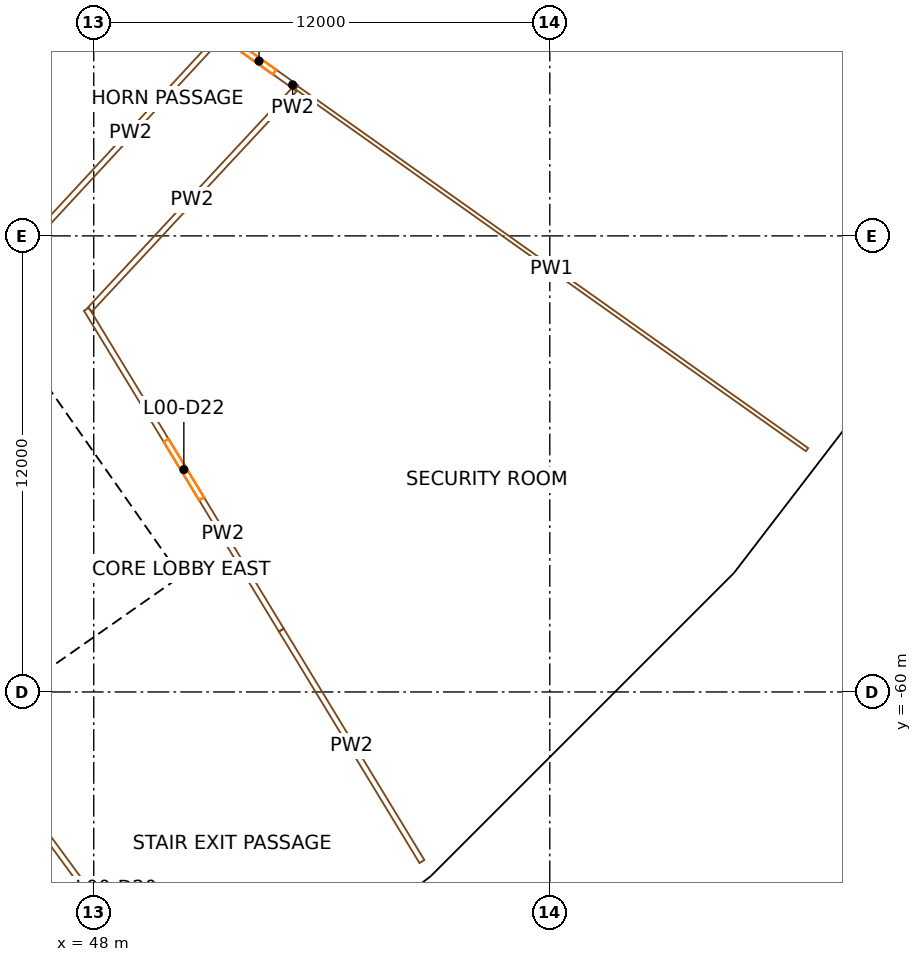
"""IFC4 building model, lengths in metres.
Left out: names, types, materials, properties, quantities, classifications, styles, units other than length and angle.
Written with IfcOpenShell. Run it as: python <this file> out.ifc"""

import sys

from ifc_helpers import new_model, si_unit, direction, frame, frame_2d, origin, origin_2d, place, context, subcontext, project, spatial, rectangle, extrude, element, fill, save


model = new_model("IFC4")
c1 = context("Model", 3, precision=1e-05, world=origin(), true_north=direction((0.0, 1.0)))
c2 = subcontext(c1, "Body", "Model", "MODEL_VIEW")
j1 = project(units=[si_unit("LENGTHUNIT", "METRE"), si_unit("PLANEANGLEUNIT", "RADIAN")], contexts=[c1])
p1 = place(None, origin())
s1 = spatial("IfcSite", under=j1, at=p1, CompositionType="ELEMENT")
p2 = place(p1, origin())
s2 = spatial("IfcBuilding", under=s1, at=p2, CompositionType="ELEMENT")
p3 = place(p2, origin())
s3 = spatial("IfcBuildingStorey", under=s2, at=p3, CompositionType="ELEMENT", Elevation=0.0)
p4 = place(p3, frame((51.264, -58.456, -0.4), z_axis=(0.0, 0.0, 1.0), x_axis=(0.751839807479, 0.6593458151, 0.0)))
e1 = element("IfcColumn", 1, at=p4, inside=s3, PredefinedType="COLUMN", context=c2, shape_type="SweptSolid", body=[
    extrude(rectangle(XDim=1.4, YDim=1.8, at=origin_2d()), origin(), (0.0, 0.0, 1.0), 9.4),
])
p5 = place(p3, frame((56.209, -64.094, -0.4), z_axis=(0.0, 0.0, 1.0), x_axis=(0.751839807479, 0.6593458151, 0.0)))
e2 = element("IfcColumn", 2, at=p5, inside=s3, PredefinedType="COLUMN", context=c2, shape_type="SweptSolid", body=[
    extrude(rectangle(XDim=1.1, YDim=1.3, at=origin_2d()), origin(), (0.0, 0.0, 1.0), 9.4),
])
p6 = place(p3, frame((58.456, -51.264, -0.4), z_axis=(0.0, 0.0, 1.0), x_axis=(0.6593458151, 0.751839807479, 0.0)))
e3 = element("IfcColumn", 3, at=p6, inside=s3, PredefinedType="COLUMN", context=c2, shape_type="SweptSolid", body=[
    extrude(rectangle(XDim=1.4, YDim=1.8, at=origin_2d()), origin(), (0.0, 0.0, 1.0), 9.4),
])
p7 = place(p3, frame((64.094, -56.209, -0.4), z_axis=(0.0, 0.0, 1.0), x_axis=(0.6593458151, 0.751839807479, 0.0)))
e4 = element("IfcColumn", 4, at=p7, inside=s3, PredefinedType="COLUMN", context=c2, shape_type="SweptSolid", body=[
    extrude(rectangle(XDim=1.1, YDim=1.3, at=origin_2d()), origin(), (0.0, 0.0, 1.0), 9.4),
])
p8 = place(p3, frame((64.647, -43.196, -0.4), z_axis=(0.0, 0.0, 1.0), x_axis=(0.55557023302, 0.831469612303, 0.0)))
e5 = element("IfcColumn", 5, at=p8, inside=s3, PredefinedType="COLUMN", context=c2, shape_type="SweptSolid", body=[
    extrude(rectangle(XDim=1.4, YDim=1.8, at=origin_2d()), origin(), (0.0, 0.0, 1.0), 9.4),
])
p9 = place(p3, frame((49.779, -57.191, 0.0), z_axis=(0.0, 0.0, 1.0), x_axis=(-0.573577477574, 0.819151315216, 0.0)))
e6 = element("IfcWall", 6, at=p9, inside=s3, PredefinedType="SHEAR", context=c2, shape_type="SweptSolid", body=[
    extrude(rectangle(XDim=14.8, YDim=0.9, at=frame_2d((7.4, 0.0))), origin(), (0.0, 0.0, 1.0), 8.6),
])
p10 = place(p9, frame((6.7, 0.0, 0.0)))
e7 = element("IfcOpeningElement", 7, at=p10, cuts=e6, PredefinedType="OPENING", context=c2, shape_type="SweptSolid", body=[
    extrude(rectangle(XDim=1.4, YDim=2.1, at=frame_2d((0.7, 1.05))), frame((0.0, 0.46, 0.0), z_axis=(0.0, -1.0, 0.0), x_axis=(1.0, 0.0, 0.0)), (0.0, 0.0, 1.0), 0.92),
])
p11 = place(p3, frame((36.827, -65.71, 0.0), z_axis=(0.0, 0.0, 1.0), x_axis=(0.819153391756, 0.573574511963, 0.0)))
e8 = element("IfcWall", 8, at=p11, inside=s3, PredefinedType="SHEAR", context=c2, shape_type="SweptSolid", body=[
    extrude(rectangle(XDim=15.045, YDim=0.9, at=frame_2d((7.523, 0.0))), origin(), (0.0, 0.0, 1.0), 8.6),
])
p12 = place(p11, frame((0.8, 0.0, 0.0)))
e9 = element("IfcOpeningElement", 9, at=p12, cuts=e8, PredefinedType="OPENING", context=c2, shape_type="SweptSolid", body=[
    extrude(rectangle(XDim=1.0, YDim=2.1, at=frame_2d((0.5, 1.05))), frame((0.0, 0.46, 0.0), z_axis=(0.0, -1.0, 0.0), x_axis=(1.0, 0.0, 0.0)), (0.0, 0.0, 1.0), 0.92),
])
p13 = place(p11, frame((3.475, 0.0, 0.0)))
e10 = element("IfcOpeningElement", 10, at=p13, cuts=e8, PredefinedType="OPENING", context=c2, shape_type="SweptSolid", body=[
    extrude(rectangle(XDim=1.0, YDim=2.1, at=frame_2d((0.5, 1.05))), frame((0.0, 0.46, 0.0), z_axis=(0.0, -1.0, 0.0), x_axis=(1.0, 0.0, 0.0)), (0.0, 0.0, 1.0), 0.92),
])
p14 = place(p11, frame((6.175, 0.0, 0.0)))
e11 = element("IfcOpeningElement", 11, at=p14, cuts=e8, PredefinedType="OPENING", context=c2, shape_type="SweptSolid", body=[
    extrude(rectangle(XDim=1.0, YDim=2.1, at=frame_2d((0.5, 1.05))), frame((0.0, 0.46, 0.0), z_axis=(0.0, -1.0, 0.0), x_axis=(1.0, 0.0, 0.0)), (0.0, 0.0, 1.0), 0.92),
])
p15 = place(p11, frame((13.495, 0.0, 0.0)))
e12 = element("IfcOpeningElement", 12, at=p15, cuts=e8, PredefinedType="OPENING", context=c2, shape_type="SweptSolid", body=[
    extrude(rectangle(XDim=1.1, YDim=2.1, at=frame_2d((0.55, 1.05))), frame((0.0, 0.46, 0.0), z_axis=(0.0, -1.0, 0.0), x_axis=(1.0, 0.0, 0.0)), (0.0, 0.0, 1.0), 0.92),
])
p16 = place(p3, frame((41.262, -57.661, 0.0), z_axis=(0.0, 0.0, 1.0), x_axis=(0.819164398642, 0.573558792102, 0.0)))
e13 = element("IfcWall", 13, at=p16, inside=s3, PredefinedType="SOLIDWALL", context=c2, shape_type="SweptSolid", body=[
    extrude(rectangle(XDim=6.795, YDim=0.3, at=frame_2d((3.397, 0.0))), origin(), (0.0, 0.0, 1.0), 8.6),
])
p17 = place(p16, frame((5.32, 0.0, 0.0)))
e14 = element("IfcOpeningElement", 14, at=p17, cuts=e13, PredefinedType="OPENING", context=c2, shape_type="SweptSolid", body=[
    extrude(rectangle(XDim=1.1, YDim=2.1, at=frame_2d((0.55, 1.05))), frame((0.0, 0.16, 0.0), z_axis=(0.0, -1.0, 0.0), x_axis=(1.0, 0.0, 0.0)), (0.0, 0.0, 1.0), 0.32),
])
p18 = place(p3, frame((46.778, -55.782, 0.0), z_axis=(0.0, 0.0, 1.0), x_axis=(0.573822822947, -0.818979467304, 0.0)))
e15 = element("IfcWall", 15, at=p18, inside=s3, PredefinedType="SOLIDWALL", context=c2, shape_type="SweptSolid", body=[
    extrude(rectangle(XDim=0.5, YDim=0.3, at=frame_2d((0.25, 0.0))), origin(), (0.0, 0.0, 1.0), 4.3),
])
p19 = place(p3, frame((47.839, -71.491, 0.0), z_axis=(0.0, 0.0, 1.0), x_axis=(0.793355377778, 0.608758773695, 0.0)))
e16 = element("IfcWall", 16, at=p19, inside=s3, PredefinedType="SOLIDWALL", context=c2, shape_type="SweptSolid", body=[
    extrude(rectangle(XDim=11.135, YDim=0.45, at=frame_2d((5.567, 0.0))), origin(), (0.0, 0.0, 1.0), 7.7),
])
p20 = place(p19, frame((8.938, 0.0, 0.0), z_axis=(0.0, 0.0, 1.0), x_axis=(-1.0, 0.0, 0.0)))
e17 = element("IfcOpeningElement", 17, at=p20, cuts=e16, PredefinedType="OPENING", context=c2, shape_type="SweptSolid", body=[
    extrude(rectangle(XDim=1.2, YDim=2.4, at=frame_2d((0.6, 1.2))), frame((0.0, 0.235, 0.0), z_axis=(0.0, -1.0, 0.0), x_axis=(1.0, 0.0, 0.0)), (0.0, 0.0, 1.0), 0.47),
])
p21 = place(p3, frame((56.699, -64.698, 0.0), z_axis=(0.0, 0.0, 1.0), x_axis=(0.707106781187, 0.707106781187, 0.0)))
e18 = element("IfcWall", 18, at=p21, inside=s3, PredefinedType="SOLIDWALL", context=c2, shape_type="SweptSolid", body=[
    extrude(rectangle(XDim=11.312, YDim=0.45, at=frame_2d((5.656, 0.0))), origin(), (0.0, 0.0, 1.0), 7.7),
])
p22 = place(p21, frame((4.756, 0.0, 0.0)))
e19 = element("IfcOpeningElement", 19, at=p22, cuts=e18, PredefinedType="OPENING", context=c2, shape_type="SweptSolid", body=[
    extrude(rectangle(XDim=1.8, YDim=2.4, at=frame_2d((0.9, 1.2))), frame((0.0, 0.235, 0.0), z_axis=(0.0, -1.0, 0.0), x_axis=(1.0, 0.0, 0.0)), (0.0, 0.0, 1.0), 0.47),
])
p23 = place(p3, frame((64.713, -56.673, 0.0), z_axis=(0.0, 0.0, 1.0), x_axis=(0.608758773695, 0.793355377778, 0.0)))
e20 = element("IfcWall", 20, at=p23, inside=s3, PredefinedType="SOLIDWALL", context=c2, shape_type="SweptSolid", body=[
    extrude(rectangle(XDim=11.135, YDim=0.45, at=frame_2d((5.567, 0.0))), origin(), (0.0, 0.0, 1.0), 7.7),
])
p24 = place(p23, frame((4.967, 0.0, 0.0)))
e21 = element("IfcOpeningElement", 21, at=p24, cuts=e20, PredefinedType="OPENING", context=c2, shape_type="SweptSolid", body=[
    extrude(rectangle(XDim=1.2, YDim=2.4, at=frame_2d((0.6, 1.2))), frame((0.0, 0.235, 0.0), z_axis=(0.0, -1.0, 0.0), x_axis=(1.0, 0.0, 0.0)), (0.0, 0.0, 1.0), 0.47),
])
p25 = place(p3, frame((46.62, -47.836, 0.0), z_axis=(0.0, 0.0, 1.0), x_axis=(0.679053871457, 0.734088441306, 0.0)))
e22 = element("IfcWall", 22, at=p25, inside=s3, PredefinedType="PARTITIONING", context=c2, shape_type="SweptSolid", body=[
    extrude(rectangle(XDim=6.916, YDim=0.15, at=frame_2d((3.458, 0.0))), origin(), (0.0, 0.0, 1.0), 7.6),
])
p26 = place(p3, frame((47.808, -49.929, 0.0), z_axis=(0.0, 0.0, 1.0), x_axis=(0.51915296508, -0.854681343454, 0.0)))
e23 = element("IfcWall", 23, at=p26, inside=s3, PredefinedType="PARTITIONING", context=c2, shape_type="SweptSolid", body=[
    extrude(rectangle(XDim=9.875, YDim=0.15, at=frame_2d((4.938, 0.0))), origin(), (0.0, 0.0, 1.0), 7.6),
])
p27 = place(p26, frame((4.037, 0.0, 0.0)))
e24 = element("IfcOpeningElement", 24, at=p27, cuts=e23, PredefinedType="OPENING", context=c2, shape_type="SweptSolid", body=[
    extrude(rectangle(XDim=1.8, YDim=2.1, at=frame_2d((0.9, 1.05))), frame((0.0, 0.085, 0.0), z_axis=(0.0, -1.0, 0.0), x_axis=(1.0, 0.0, 0.0)), (0.0, 0.0, 1.0), 0.17),
])
p28 = place(p3, frame((47.898, -49.938, 0.0), z_axis=(0.0, 0.0, 1.0), x_axis=(0.681001874973, 0.73228167141, 0.0)))
e25 = element("IfcWall", 25, at=p28, inside=s3, PredefinedType="PARTITIONING", context=c2, shape_type="SweptSolid", body=[
    extrude(rectangle(XDim=7.903, YDim=0.15, at=frame_2d((3.952, 0.0))), origin(), (0.0, 0.0, 1.0), 7.6),
])
p29 = place(p3, frame((50.635, -69.062, 0.0), z_axis=(0.0, 0.0, 1.0), x_axis=(-0.591288618584, 0.806460023518, 0.0)))
e26 = element("IfcWall", 26, at=p29, inside=s3, PredefinedType="PARTITIONING", context=c2, shape_type="SweptSolid", body=[
    extrude(rectangle(XDim=6.911, YDim=0.15, at=frame_2d((3.456, 0.0))), origin(), (0.0, 0.0, 1.0), 7.6),
])
p30 = place(p29, frame((3.005, 0.0, 0.0)))
e27 = element("IfcOpeningElement", 27, at=p30, cuts=e26, PredefinedType="OPENING", context=c2, shape_type="SweptSolid", body=[
    extrude(rectangle(XDim=0.9, YDim=2.1, at=frame_2d((0.45, 1.05))), frame((0.0, 0.085, 0.0), z_axis=(0.0, -1.0, 0.0), x_axis=(1.0, 0.0, 0.0)), (0.0, 0.0, 1.0), 0.17),
])
p31 = place(p3, frame((52.937, -58.374, 0.0), z_axis=(0.0, 0.0, 1.0), x_axis=(0.519165960752, -0.854673449451, 0.0)))
e28 = element("IfcWall", 28, at=p31, inside=s3, PredefinedType="PARTITIONING", context=c2, shape_type="SweptSolid", body=[
    extrude(rectangle(XDim=7.123, YDim=0.15, at=frame_2d((3.561, 0.0))), origin(), (0.0, 0.0, 1.0), 7.6),
])
p32 = place(p3, frame((51.367, -42.704, 0.0), z_axis=(0.0, 0.0, 1.0), x_axis=(0.815709395679, -0.578461910415, 0.0)))
e29 = element("IfcWall", 29, at=p32, inside=s3, PredefinedType="PARTITIONING", context=c2, shape_type="SweptSolid", body=[
    extrude(rectangle(XDim=2.407, YDim=0.15, at=frame_2d((1.204, 0.0))), origin(), (0.0, 0.0, 1.0), 7.6),
])
p33 = place(p32, frame((0.703, 0.0, 0.0)))
e30 = element("IfcOpeningElement", 30, at=p33, cuts=e29, PredefinedType="OPENING", context=c2, shape_type="SweptSolid", body=[
    extrude(rectangle(XDim=1.0, YDim=2.1, at=frame_2d((0.5, 1.05))), frame((0.0, 0.085, 0.0), z_axis=(0.0, -1.0, 0.0), x_axis=(1.0, 0.0, 0.0)), (0.0, 0.0, 1.0), 0.17),
])
p34 = place(p3, frame((66.769, -53.625, 0.0), z_axis=(0.0, 0.0, 1.0), x_axis=(-0.815733399652, 0.578428060083, 0.0)))
e31 = element("IfcWall", 31, at=p34, inside=s3, PredefinedType="PARTITIONING", context=c2, shape_type="SweptSolid", body=[
    extrude(rectangle(XDim=16.473, YDim=0.1, at=frame_2d((8.237, 0.0))), origin(), (0.0, 0.0, 1.0), 7.6),
])
p35 = place(p15, origin())
e32 = element("IfcDoor", 32, at=p35, inside=s3, OperationType="SINGLE_SWING_LEFT", PredefinedType="DOOR", context=c2, shape_type="SweptSolid", body=[
    extrude(rectangle(XDim=1.1, YDim=2.1, at=frame_2d((0.55, 1.05))), frame((0.0, 0.025, 0.0), z_axis=(0.0, -1.0, 0.0), x_axis=(1.0, 0.0, 0.0)), (0.0, 0.0, 1.0), 0.05),
])
fill(e12, e32)
p36 = place(p22, origin())
e33 = element("IfcDoor", 33, at=p36, inside=s3, OperationType="DOUBLE_DOOR_DOUBLE_SWING", PredefinedType="DOOR", context=c2, shape_type="SweptSolid", body=[
    extrude(rectangle(XDim=1.8, YDim=2.4, at=frame_2d((0.9, 1.2))), frame((0.0, 0.025, 0.0), z_axis=(0.0, -1.0, 0.0), x_axis=(1.0, 0.0, 0.0)), (0.0, 0.0, 1.0), 0.05),
])
fill(e19, e33)
p37 = place(p27, origin())
e34 = element("IfcDoor", 34, at=p37, inside=s3, OperationType="DOUBLE_DOOR_SINGLE_SWING", PredefinedType="DOOR", context=c2, shape_type="SweptSolid", body=[
    extrude(rectangle(XDim=1.8, YDim=2.1, at=frame_2d((0.9, 1.05))), frame((0.0, 0.025, 0.0), z_axis=(0.0, -1.0, 0.0), x_axis=(1.0, 0.0, 0.0)), (0.0, 0.0, 1.0), 0.05),
])
fill(e24, e34)
p38 = place(p33, origin())
e35 = element("IfcDoor", 35, at=p38, inside=s3, OperationType="SINGLE_SWING_RIGHT", PredefinedType="DOOR", context=c2, shape_type="SweptSolid", body=[
    extrude(rectangle(XDim=1.0, YDim=2.1, at=frame_2d((0.5, 1.05))), frame((0.0, 0.025, 0.0), z_axis=(0.0, -1.0, 0.0), x_axis=(1.0, 0.0, 0.0)), (0.0, 0.0, 1.0), 0.05),
])
fill(e30, e35)
save(model, sys.argv[1])
